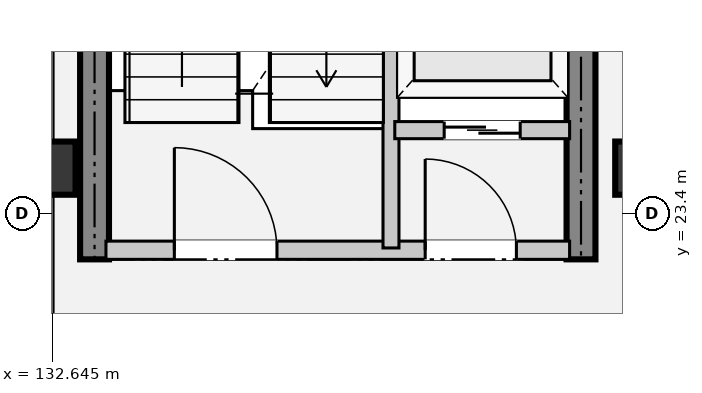
"""IFC4 building model, lengths in metres.
Left out: names, types, materials, properties, quantities, classifications, styles, units other than length and angle.
Written with IfcOpenShell. Run it as: python <this file> out.ifc"""

import sys

from ifc_helpers import new_model, si_unit, direction, frame, frame_2d, origin, origin_2d, place, context, subcontext, project, spatial, rectangle, extrude, element, fill, save


model = new_model("IFC4")
c1 = context("Model", 3, precision=1e-05, world=origin(), true_north=direction((0.0, 1.0)))
c2 = subcontext(c1, "Body", "Model", "MODEL_VIEW")
j1 = project(units=[si_unit("LENGTHUNIT", "METRE"), si_unit("PLANEANGLEUNIT", "RADIAN")], contexts=[c1])
p1 = place(None, origin())
s1 = spatial("IfcSite", under=j1, at=p1, CompositionType="ELEMENT")
p2 = place(p1, origin())
s2 = spatial("IfcBuilding", under=s1, at=p2, CompositionType="ELEMENT")
p3 = place(p2, frame((0.0, 0.0, 5.4)))
s3 = spatial("IfcBuildingStorey", under=s2, at=p3, CompositionType="ELEMENT", Elevation=5.4)
for number, where, z_axis, x_axis in (
    (1, (132.6, 24.0, 0.0), (0.0, 0.0, 1.0), (1.0, 0.0, 0.0)),
    (2, (140.4, 24.0, 0.0), (0.0, 0.0, 1.0), (1.0, 0.0, 0.0)),
):
    element("IfcColumn", number, at=place(p3, frame(where, z_axis=z_axis, x_axis=x_axis)), inside=s3, PredefinedType="COLUMN", context=c2, shape_type="SweptSolid", body=[
        extrude(rectangle(XDim=0.7, YDim=0.7, at=origin_2d()), origin(), (0.0, 0.0, 1.0), 4.8),
    ])
for number, where, z_axis, x_axis in (
    (3, (133.2, 22.8, 0.0), (0.0, 0.0, 1.0), (0.0, 1.0, 0.0)),
    (4, (139.6, 22.8, 0.0), (0.0, 0.0, 1.0), (0.0, 1.0, 0.0)),
):
    element("IfcWall", number, at=place(p3, frame(where, z_axis=z_axis, x_axis=x_axis)), inside=s3, PredefinedType="SHEAR", context=c2, shape_type="SweptSolid", body=[
        extrude(rectangle(XDim=8.6, YDim=0.38, at=frame_2d((4.3, 0.0))), origin(), (0.0, 0.0, 1.0), 4.8),
    ])
p4 = place(p3, frame((133.35, 22.92, 0.0), z_axis=(0.0, 0.0, 1.0), x_axis=(1.0, 0.0, 0.0)))
e5 = element("IfcWall", 5, at=p4, inside=s3, PredefinedType="PARTITIONING", context=c2, shape_type="SweptSolid", body=[
    extrude(rectangle(XDim=6.1, YDim=0.24, at=frame_2d((3.05, 0.0))), origin(), (0.0, 0.0, 1.0), 3.86),
])
p5 = place(p4, frame((0.9, 0.0, 0.0)))
e6 = element("IfcOpeningElement", 6, at=p5, cuts=e5, PredefinedType="OPENING", context=c2, shape_type="SweptSolid", body=[
    extrude(rectangle(XDim=1.35, YDim=2.2, at=frame_2d((0.675, 1.1))), frame((0.0, 0.13, 0.0), z_axis=(0.0, -1.0, 0.0), x_axis=(1.0, 0.0, 0.0)), (0.0, 0.0, 1.0), 0.26),
])
p6 = place(p4, frame((4.2, 0.0, 0.0)))
e7 = element("IfcOpeningElement", 7, at=p6, cuts=e5, PredefinedType="OPENING", context=c2, shape_type="SweptSolid", body=[
    extrude(rectangle(XDim=1.2, YDim=2.2, at=frame_2d((0.6, 1.1))), frame((0.0, 0.13, 0.0), z_axis=(0.0, -1.0, 0.0), x_axis=(1.0, 0.0, 0.0)), (0.0, 0.0, 1.0), 0.26),
])
p7 = place(p3, frame((137.1, 22.95, 0.0), z_axis=(0.0, 0.0, 1.0), x_axis=(0.0, 1.0, 0.0)))
e8 = element("IfcWall", 8, at=p7, inside=s3, PredefinedType="PARTITIONING", context=c2, shape_type="SweptSolid", body=[
    extrude(rectangle(XDim=8.3, YDim=0.21, at=frame_2d((4.15, 0.0))), origin(), (0.0, 0.0, 1.0), 3.86),
])
p8 = place(p3, frame((137.15, 24.5, 0.0), z_axis=(0.0, 0.0, 1.0), x_axis=(1.0, 0.0, 0.0)))
e9 = element("IfcWall", 9, at=p8, inside=s3, PredefinedType="PARTITIONING", context=c2, shape_type="SweptSolid", body=[
    extrude(rectangle(XDim=2.3, YDim=0.225, at=frame_2d((1.15, 0.0))), origin(), (0.0, 0.0, 1.0), 3.86),
])
p9 = place(p8, frame((0.65, 0.0, 0.0)))
e10 = element("IfcOpeningElement", 10, at=p9, cuts=e9, PredefinedType="OPENING", context=c2, shape_type="SweptSolid", body=[
    extrude(rectangle(XDim=1.0, YDim=2.15, at=frame_2d((0.5, 1.075))), frame((0.0, 0.123, 0.0), z_axis=(0.0, -1.0, 0.0), x_axis=(1.0, 0.0, 0.0)), (0.0, 0.0, 1.0), 0.245),
])
p10 = place(p5, origin())
e11 = element("IfcDoor", 11, at=p10, inside=s3, OperationType="SINGLE_SWING_LEFT", PredefinedType="DOOR", context=c2, shape_type="SweptSolid", body=[
    extrude(rectangle(XDim=1.35, YDim=2.2, at=frame_2d((0.675, 1.1))), frame((0.0, 0.025, 0.0), z_axis=(0.0, -1.0, 0.0), x_axis=(1.0, 0.0, 0.0)), (0.0, 0.0, 1.0), 0.05),
])
fill(e6, e11)
p11 = place(p6, origin())
e12 = element("IfcDoor", 12, at=p11, inside=s3, OperationType="SINGLE_SWING_RIGHT", PredefinedType="DOOR", context=c2, shape_type="SweptSolid", body=[
    extrude(rectangle(XDim=1.2, YDim=2.2, at=frame_2d((0.6, 1.1))), frame((0.0, 0.025, 0.0), z_axis=(0.0, -1.0, 0.0), x_axis=(1.0, 0.0, 0.0)), (0.0, 0.0, 1.0), 0.05),
])
fill(e7, e12)
p12 = place(p9, origin())
e13 = element("IfcDoor", 13, at=p12, inside=s3, OperationType="SLIDING_TO_LEFT", PredefinedType="DOOR", context=c2, shape_type="SweptSolid", body=[
    extrude(rectangle(XDim=1.0, YDim=2.15, at=frame_2d((0.5, 1.075))), frame((0.0, 0.025, 0.0), z_axis=(0.0, -1.0, 0.0), x_axis=(1.0, 0.0, 0.0)), (0.0, 0.0, 1.0), 0.05),
])
fill(e10, e13)
save(model, sys.argv[1])
